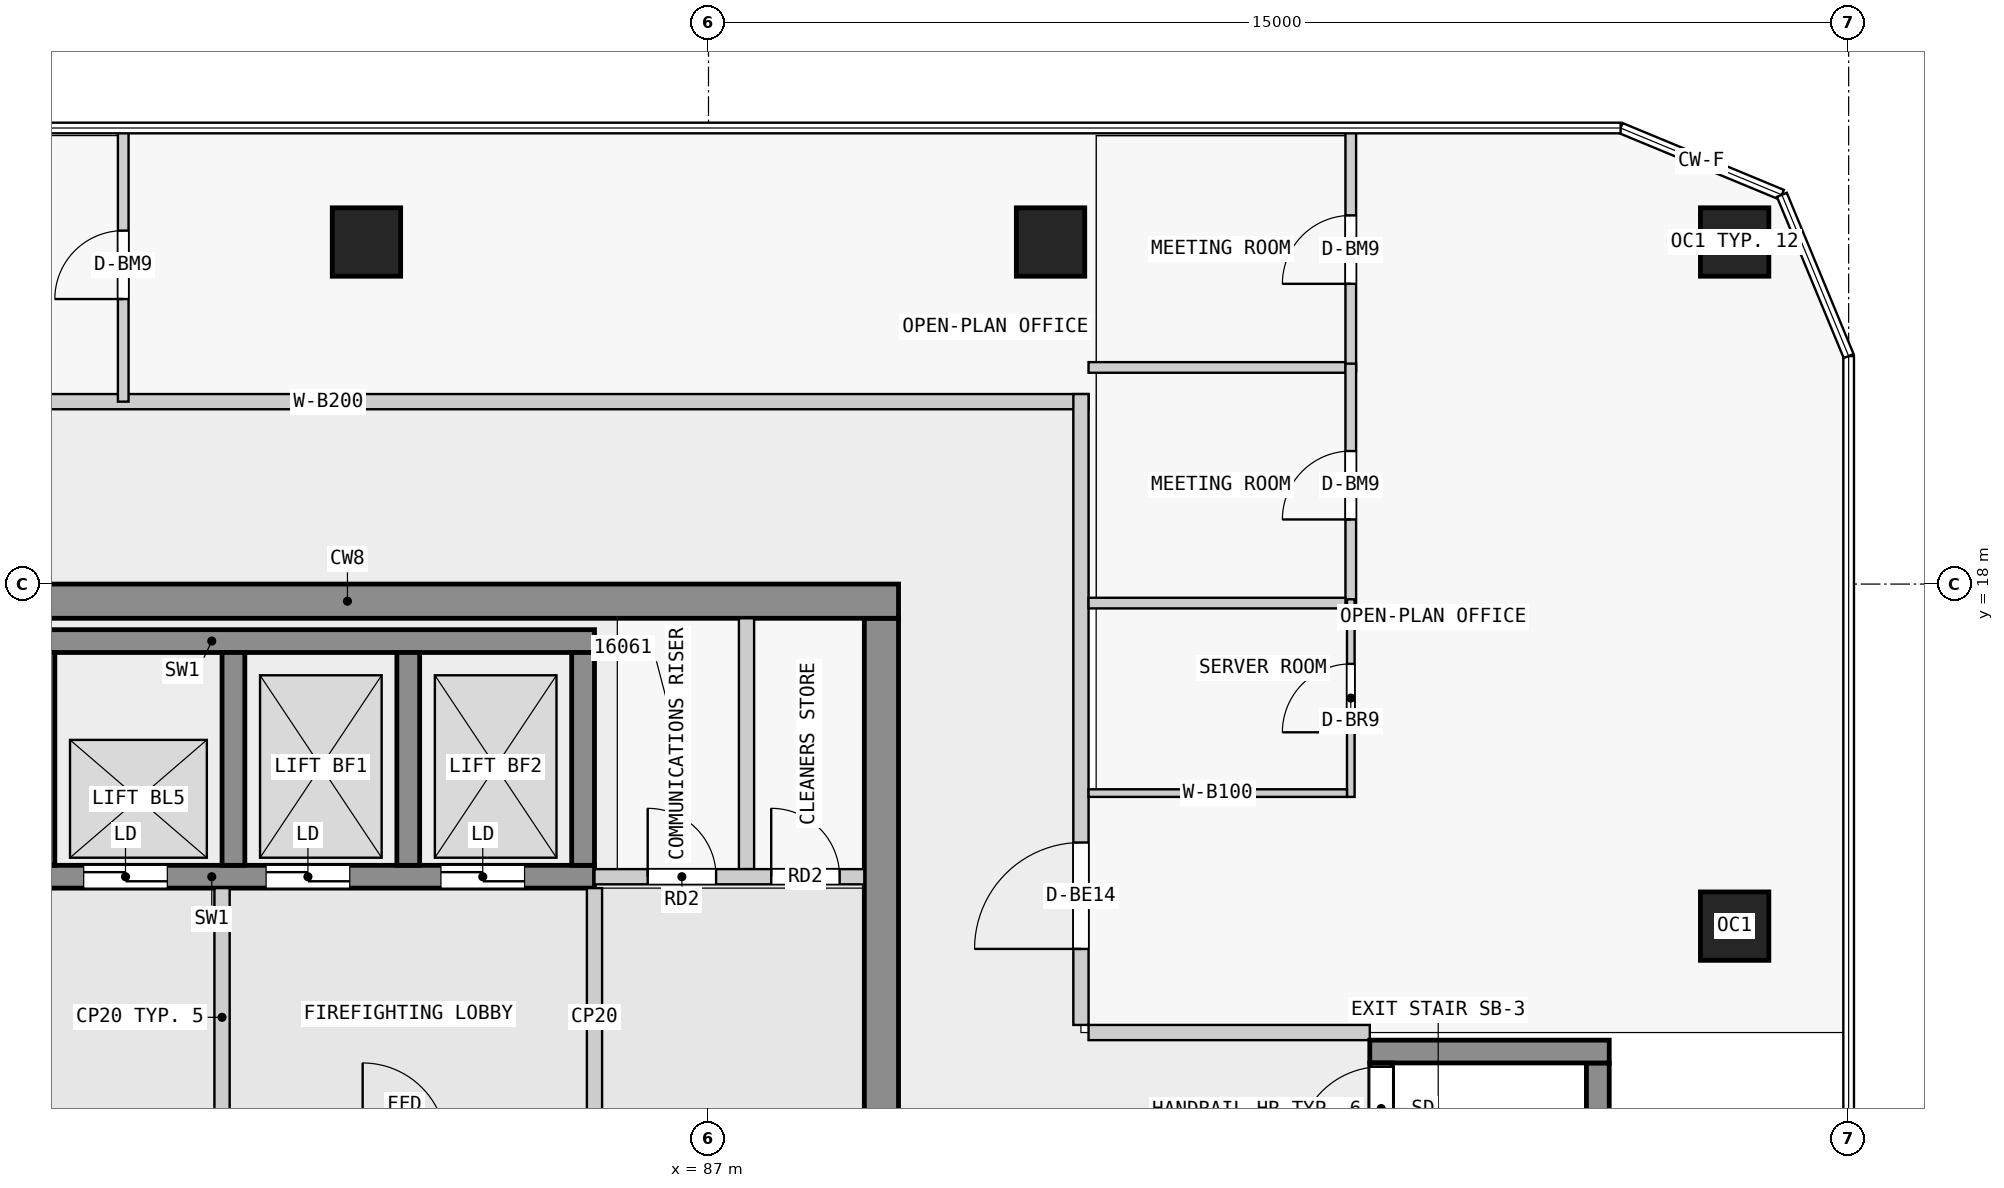
"""IFC4 building model, lengths in metres.
Left out: names, types, materials, properties, quantities, classifications, styles, units other than length and angle.
Written with IfcOpenShell. Run it as: python <this file> out.ifc"""

import sys

from ifc_helpers import new_model, si_unit, direction, frame, frame_2d, origin, origin_2d, place, context, subcontext, project, spatial, rectangle, extrude, element, fill, save


model = new_model("IFC4")
c1 = context("Model", 3, precision=1e-05, world=origin(), true_north=direction((0.0, 1.0)))
c2 = subcontext(c1, "Body", "Model", "MODEL_VIEW")
j1 = project(units=[si_unit("LENGTHUNIT", "METRE"), si_unit("PLANEANGLEUNIT", "RADIAN")], contexts=[c1])
p1 = place(None, origin())
s1 = spatial("IfcSite", under=j1, at=p1, CompositionType="ELEMENT")
p2 = place(p1, origin())
s2 = spatial("IfcBuilding", under=s1, at=p2, CompositionType="ELEMENT")
p3 = place(p2, frame((0.0, 0.0, 65.3)))
s3 = spatial("IfcBuildingStorey", under=s2, at=p3, CompositionType="ELEMENT", Elevation=65.3)
for number, where, z_axis, x_axis in (
    (1, (100.5, 13.5, 0.0), (0.0, 0.0, 1.0), (1.0, 0.0, 0.0)),
    (2, (100.5, 22.5, 0.0), (0.0, 0.0, 1.0), (1.0, 0.0, 0.0)),
    (3, (91.5, 22.5, 0.0), (0.0, 0.0, 1.0), (1.0, 0.0, 0.0)),
    (4, (82.5, 22.5, 0.0), (0.0, 0.0, 1.0), (1.0, 0.0, 0.0)),
):
    element("IfcColumn", number, at=place(p3, frame(where, z_axis=z_axis, x_axis=x_axis)), inside=s3, PredefinedType="COLUMN", context=c2, shape_type="SweptSolid", body=[
        extrude(rectangle(XDim=0.9, YDim=0.9, at=origin_2d()), origin(), (0.0, 0.0, 1.0), 3.5),
    ])
p4 = place(p3, frame((75.0, 17.775, 0.0), z_axis=(0.0, 0.0, 1.0), x_axis=(1.0, 0.0, 0.0)))
e5 = element("IfcWall", 5, at=p4, inside=s3, PredefinedType="SHEAR", context=c2, shape_type="SweptSolid", body=[
    extrude(rectangle(XDim=14.5, YDim=0.45, at=frame_2d((7.25, 0.0))), origin(), (0.0, 0.0, 1.0), 3.25),
])
p5 = place(p3, frame((89.275, 0.45, 0.0), z_axis=(0.0, 0.0, 1.0), x_axis=(0.0, 1.0, 0.0)))
e6 = element("IfcWall", 6, at=p5, inside=s3, PredefinedType="SHEAR", context=c2, shape_type="SweptSolid", body=[
    extrude(rectangle(XDim=17.1, YDim=0.45, at=frame_2d((8.55, 0.0))), origin(), (0.0, 0.0, 1.0), 3.25),
])
p6 = place(p5, frame((7.65, 0.0, 0.0)))
e7 = element("IfcOpeningElement", 7, at=p6, cuts=e6, PredefinedType="OPENING", context=c2, shape_type="SweptSolid", body=[
    extrude(rectangle(XDim=1.8, YDim=2.1, at=frame_2d((0.9, 1.05))), frame((0.0, 0.235, 0.0), z_axis=(0.0, -1.0, 0.0), x_axis=(1.0, 0.0, 0.0)), (0.0, 0.0, 1.0), 0.47),
])
p7 = place(p3, frame((75.43, 17.25, 0.0), z_axis=(0.0, 0.0, 1.0), x_axis=(1.0, 0.0, 0.0)))
e8 = element("IfcWall", 8, at=p7, inside=s3, PredefinedType="SHEAR", context=c2, shape_type="SweptSolid", body=[
    extrude(rectangle(XDim=10.07, YDim=0.3, at=frame_2d((5.035, 0.0))), origin(), (0.0, 0.0, 1.0), 3.25),
])
p8 = place(p3, frame((75.43, 14.15, 0.0), z_axis=(0.0, 0.0, 1.0), x_axis=(1.0, 0.0, 0.0)))
e9 = element("IfcWall", 9, at=p8, inside=s3, PredefinedType="SHEAR", context=c2, shape_type="SweptSolid", body=[
    extrude(rectangle(XDim=10.07, YDim=0.3, at=frame_2d((5.035, 0.0))), origin(), (0.0, 0.0, 1.0), 3.25),
])
p9 = place(p8, frame((0.85, 0.0, 0.0)))
e10 = element("IfcOpeningElement", 10, at=p9, cuts=e9, PredefinedType="OPENING", context=c2, shape_type="SweptSolid", body=[
    extrude(rectangle(XDim=1.1, YDim=2.1, at=frame_2d((0.55, 1.05))), frame((0.0, 0.16, 0.0), z_axis=(0.0, -1.0, 0.0), x_axis=(1.0, 0.0, 0.0)), (0.0, 0.0, 1.0), 0.32),
])
p10 = place(p8, frame((3.35, 0.0, 0.0)))
e11 = element("IfcOpeningElement", 11, at=p10, cuts=e9, PredefinedType="OPENING", context=c2, shape_type="SweptSolid", body=[
    extrude(rectangle(XDim=1.1, YDim=2.1, at=frame_2d((0.55, 1.05))), frame((0.0, 0.16, 0.0), z_axis=(0.0, -1.0, 0.0), x_axis=(1.0, 0.0, 0.0)), (0.0, 0.0, 1.0), 0.32),
])
p11 = place(p8, frame((5.75, 0.0, 0.0)))
e12 = element("IfcOpeningElement", 12, at=p11, cuts=e9, PredefinedType="OPENING", context=c2, shape_type="SweptSolid", body=[
    extrude(rectangle(XDim=1.1, YDim=2.1, at=frame_2d((0.55, 1.05))), frame((0.0, 0.16, 0.0), z_axis=(0.0, -1.0, 0.0), x_axis=(1.0, 0.0, 0.0)), (0.0, 0.0, 1.0), 0.32),
])
p12 = place(p8, frame((8.05, 0.0, 0.0)))
e13 = element("IfcOpeningElement", 13, at=p12, cuts=e9, PredefinedType="OPENING", context=c2, shape_type="SweptSolid", body=[
    extrude(rectangle(XDim=1.1, YDim=2.1, at=frame_2d((0.55, 1.05))), frame((0.0, 0.16, 0.0), z_axis=(0.0, -1.0, 0.0), x_axis=(1.0, 0.0, 0.0)), (0.0, 0.0, 1.0), 0.32),
])
for number, where, z_axis, x_axis in (
    (14, (78.25, 14.3, 0.0), (0.0, 0.0, 1.0), (0.0, 1.0, 0.0)),
    (15, (80.75, 14.3, 0.0), (0.0, 0.0, 1.0), (0.0, 1.0, 0.0)),
    (16, (83.05, 14.3, 0.0), (0.0, 0.0, 1.0), (0.0, 1.0, 0.0)),
    (17, (85.35, 14.3, 0.0), (0.0, 0.0, 1.0), (0.0, 1.0, 0.0)),
):
    element("IfcWall", number, at=place(p3, frame(where, z_axis=z_axis, x_axis=x_axis)), inside=s3, PredefinedType="SHEAR", context=c2, shape_type="SweptSolid", body=[
        extrude(rectangle(XDim=2.8, YDim=0.3, at=frame_2d((1.4, 0.0))), origin(), (0.0, 0.0, 1.0), 3.25),
    ])
p13 = place(p3, frame((95.85, 5.3, 0.0), z_axis=(0.0, 0.0, 1.0), x_axis=(0.0, 1.0, 0.0)))
e18 = element("IfcWall", 18, at=p13, inside=s3, PredefinedType="SHEAR", context=c2, shape_type="SweptSolid", body=[
    extrude(rectangle(XDim=6.4, YDim=0.3, at=frame_2d((3.2, 0.0))), origin(), (0.0, 0.0, 1.0), 3.25),
])
p14 = place(p13, frame((5.25, 0.0, 0.0)))
e19 = element("IfcOpeningElement", 19, at=p14, cuts=e18, PredefinedType="OPENING", context=c2, shape_type="SweptSolid", body=[
    extrude(rectangle(XDim=1.1, YDim=2.1, at=frame_2d((0.55, 1.05))), frame((0.0, 0.16, 0.0), z_axis=(0.0, -1.0, 0.0), x_axis=(1.0, 0.0, 0.0)), (0.0, 0.0, 1.0), 0.32),
])
p15 = place(p3, frame((98.7, 5.3, 0.0), z_axis=(0.0, 0.0, 1.0), x_axis=(0.0, 1.0, 0.0)))
e20 = element("IfcWall", 20, at=p15, inside=s3, PredefinedType="SHEAR", context=c2, shape_type="SweptSolid", body=[
    extrude(rectangle(XDim=6.4, YDim=0.3, at=frame_2d((3.2, 0.0))), origin(), (0.0, 0.0, 1.0), 3.25),
])
p16 = place(p3, frame((95.7, 11.85, 0.0), z_axis=(0.0, 0.0, 1.0), x_axis=(1.0, 0.0, 0.0)))
e21 = element("IfcWall", 21, at=p16, inside=s3, PredefinedType="SHEAR", context=c2, shape_type="SweptSolid", body=[
    extrude(rectangle(XDim=3.15, YDim=0.3, at=frame_2d((1.575, 0.0))), origin(), (0.0, 0.0, 1.0), 3.25),
])
for number, where, z_axis, x_axis in (
    (22, (80.6, 10.6, 0.0), (0.0, 0.0, 1.0), (0.0, 1.0, 0.0)),
    (23, (85.5, 10.6, 0.0), (0.0, 0.0, 1.0), (0.0, 1.0, 0.0)),
):
    element("IfcWall", number, at=place(p3, frame(where, z_axis=z_axis, x_axis=x_axis)), inside=s3, PredefinedType="PARTITIONING", context=c2, shape_type="SweptSolid", body=[
        extrude(rectangle(XDim=3.4, YDim=0.2, at=frame_2d((1.7, 0.0))), origin(), (0.0, 0.0, 1.0), 3.25),
    ])
p17 = place(p3, frame((85.5, 14.15, 0.0), z_axis=(0.0, 0.0, 1.0), x_axis=(1.0, 0.0, 0.0)))
e24 = element("IfcWall", 24, at=p17, inside=s3, PredefinedType="PARTITIONING", context=c2, shape_type="SweptSolid", body=[
    extrude(rectangle(XDim=3.55, YDim=0.2, at=frame_2d((1.775, 0.0))), origin(), (0.0, 0.0, 1.0), 3.25),
])
p18 = place(p17, frame((0.7, 0.0, 0.0)))
e25 = element("IfcOpeningElement", 25, at=p18, cuts=e24, PredefinedType="OPENING", context=c2, shape_type="SweptSolid", body=[
    extrude(rectangle(XDim=0.9, YDim=2.1, at=frame_2d((0.45, 1.05))), frame((0.0, 0.11, 0.0), z_axis=(0.0, -1.0, 0.0), x_axis=(1.0, 0.0, 0.0)), (0.0, 0.0, 1.0), 0.22),
])
p19 = place(p17, frame((2.325, 0.0, 0.0)))
e26 = element("IfcOpeningElement", 26, at=p19, cuts=e24, PredefinedType="OPENING", context=c2, shape_type="SweptSolid", body=[
    extrude(rectangle(XDim=0.9, YDim=2.1, at=frame_2d((0.45, 1.05))), frame((0.0, 0.11, 0.0), z_axis=(0.0, -1.0, 0.0), x_axis=(1.0, 0.0, 0.0)), (0.0, 0.0, 1.0), 0.22),
])
p20 = place(p3, frame((87.5, 14.25, 0.0), z_axis=(0.0, 0.0, 1.0), x_axis=(0.0, 1.0, 0.0)))
e27 = element("IfcWall", 27, at=p20, inside=s3, PredefinedType="PARTITIONING", context=c2, shape_type="SweptSolid", body=[
    extrude(rectangle(XDim=3.3, YDim=0.2, at=frame_2d((1.65, 0.0))), origin(), (0.0, 0.0, 1.0), 3.25),
])
p21 = place(p3, frame((72.0, 20.4, 0.0), z_axis=(0.0, 0.0, 1.0), x_axis=(1.0, 0.0, 0.0)))
e28 = element("IfcWall", 28, at=p21, inside=s3, PredefinedType="PARTITIONING", context=c2, shape_type="SweptSolid", body=[
    extrude(rectangle(XDim=20.0, YDim=0.2, at=frame_2d((10.0, 0.0))), origin(), (0.0, 0.0, 1.0), 3.25),
])
p22 = place(p3, frame((91.9, 12.2, 0.0), z_axis=(0.0, 0.0, 1.0), x_axis=(0.0, 1.0, 0.0)))
e29 = element("IfcWall", 29, at=p22, inside=s3, PredefinedType="PARTITIONING", context=c2, shape_type="SweptSolid", body=[
    extrude(rectangle(XDim=8.3, YDim=0.2, at=frame_2d((4.15, 0.0))), origin(), (0.0, 0.0, 1.0), 3.25),
])
p23 = place(p22, frame((1.0, 0.0, 0.0)))
e30 = element("IfcOpeningElement", 30, at=p23, cuts=e29, PredefinedType="OPENING", context=c2, shape_type="SweptSolid", body=[
    extrude(rectangle(XDim=1.4, YDim=2.4, at=frame_2d((0.7, 1.2))), frame((0.0, 0.11, 0.0), z_axis=(0.0, -1.0, 0.0), x_axis=(1.0, 0.0, 0.0)), (0.0, 0.0, 1.0), 0.22),
])
p24 = place(p3, frame((92.0, 12.1, 0.0), z_axis=(0.0, 0.0, 1.0), x_axis=(1.0, 0.0, 0.0)))
e31 = element("IfcWall", 31, at=p24, inside=s3, PredefinedType="PARTITIONING", context=c2, shape_type="SweptSolid", body=[
    extrude(rectangle(XDim=3.7, YDim=0.2, at=frame_2d((1.85, 0.0))), origin(), (0.0, 0.0, 1.0), 3.25),
])
p25 = place(p3, frame((95.45, 20.8, 0.0), z_axis=(0.0, 0.0, 1.0), x_axis=(0.0, 1.0, 0.0)))
e32 = element("IfcWall", 32, at=p25, inside=s3, PredefinedType="PARTITIONING", context=c2, shape_type="SweptSolid", body=[
    extrude(rectangle(XDim=3.2, YDim=0.14, at=frame_2d((1.6, 0.0))), origin(), (0.0, 0.0, 1.0), 3.25),
])
p26 = place(p25, frame((1.15, 0.0, 0.0)))
e33 = element("IfcOpeningElement", 33, at=p26, cuts=e32, PredefinedType="OPENING", context=c2, shape_type="SweptSolid", body=[
    extrude(rectangle(XDim=0.9, YDim=2.4, at=frame_2d((0.45, 1.2))), frame((0.0, 0.08, 0.0), z_axis=(0.0, -1.0, 0.0), x_axis=(1.0, 0.0, 0.0)), (0.0, 0.0, 1.0), 0.16),
])
p27 = place(p3, frame((92.0, 20.85, 0.0), z_axis=(0.0, 0.0, 1.0), x_axis=(1.0, 0.0, 0.0)))
e34 = element("IfcWall", 34, at=p27, inside=s3, PredefinedType="PARTITIONING", context=c2, shape_type="SweptSolid", body=[
    extrude(rectangle(XDim=3.38, YDim=0.14, at=frame_2d((1.69, 0.0))), origin(), (0.0, 0.0, 1.0), 3.25),
])
p28 = place(p3, frame((95.45, 17.7, 0.0), z_axis=(0.0, 0.0, 1.0), x_axis=(0.0, 1.0, 0.0)))
e35 = element("IfcWall", 35, at=p28, inside=s3, PredefinedType="PARTITIONING", context=c2, shape_type="SweptSolid", body=[
    extrude(rectangle(XDim=3.2, YDim=0.14, at=frame_2d((1.6, 0.0))), origin(), (0.0, 0.0, 1.0), 3.25),
])
p29 = place(p28, frame((1.15, 0.0, 0.0)))
e36 = element("IfcOpeningElement", 36, at=p29, cuts=e35, PredefinedType="OPENING", context=c2, shape_type="SweptSolid", body=[
    extrude(rectangle(XDim=0.9, YDim=2.4, at=frame_2d((0.45, 1.2))), frame((0.0, 0.08, 0.0), z_axis=(0.0, -1.0, 0.0), x_axis=(1.0, 0.0, 0.0)), (0.0, 0.0, 1.0), 0.16),
])
p30 = place(p3, frame((92.0, 17.75, 0.0), z_axis=(0.0, 0.0, 1.0), x_axis=(1.0, 0.0, 0.0)))
e37 = element("IfcWall", 37, at=p30, inside=s3, PredefinedType="PARTITIONING", context=c2, shape_type="SweptSolid", body=[
    extrude(rectangle(XDim=3.38, YDim=0.14, at=frame_2d((1.69, 0.0))), origin(), (0.0, 0.0, 1.0), 3.25),
])
p31 = place(p3, frame((95.45, 15.2, 0.0), z_axis=(0.0, 0.0, 1.0), x_axis=(0.0, 1.0, 0.0)))
e38 = element("IfcWall", 38, at=p31, inside=s3, PredefinedType="PARTITIONING", context=c2, shape_type="SweptSolid", body=[
    extrude(rectangle(XDim=2.6, YDim=0.1, at=frame_2d((1.3, 0.0))), origin(), (0.0, 0.0, 1.0), 3.25),
])
p32 = place(p31, frame((0.85, 0.0, 0.0)))
e39 = element("IfcOpeningElement", 39, at=p32, cuts=e38, PredefinedType="OPENING", context=c2, shape_type="SweptSolid", body=[
    extrude(rectangle(XDim=0.9, YDim=2.1, at=frame_2d((0.45, 1.05))), frame((0.0, 0.06, 0.0), z_axis=(0.0, -1.0, 0.0), x_axis=(1.0, 0.0, 0.0)), (0.0, 0.0, 1.0), 0.12),
])
p33 = place(p3, frame((92.0, 15.25, 0.0), z_axis=(0.0, 0.0, 1.0), x_axis=(1.0, 0.0, 0.0)))
e40 = element("IfcWall", 40, at=p33, inside=s3, PredefinedType="PARTITIONING", context=c2, shape_type="SweptSolid", body=[
    extrude(rectangle(XDim=3.4, YDim=0.1, at=frame_2d((1.7, 0.0))), origin(), (0.0, 0.0, 1.0), 3.25),
])
p34 = place(p3, frame((79.3, 20.4, 0.0), z_axis=(0.0, 0.0, 1.0), x_axis=(0.0, 1.0, 0.0)))
e41 = element("IfcWall", 41, at=p34, inside=s3, PredefinedType="PARTITIONING", context=c2, shape_type="SweptSolid", body=[
    extrude(rectangle(XDim=3.6, YDim=0.14, at=frame_2d((1.8, 0.0))), origin(), (0.0, 0.0, 1.0), 3.25),
])
p35 = place(p34, frame((1.35, 0.0, 0.0)))
e42 = element("IfcOpeningElement", 42, at=p35, cuts=e41, PredefinedType="OPENING", context=c2, shape_type="SweptSolid", body=[
    extrude(rectangle(XDim=0.9, YDim=2.4, at=frame_2d((0.45, 1.2))), frame((0.0, 0.08, 0.0), z_axis=(0.0, -1.0, 0.0), x_axis=(1.0, 0.0, 0.0)), (0.0, 0.0, 1.0), 0.16),
])
p36 = place(p10, origin())
e43 = element("IfcDoor", 43, at=p36, inside=s3, OperationType="DOUBLE_DOOR_SLIDING", PredefinedType="DOOR", context=c2, shape_type="SweptSolid", body=[
    extrude(rectangle(XDim=1.1, YDim=2.1, at=frame_2d((0.55, 1.05))), frame((0.0, 0.025, 0.0), z_axis=(0.0, -1.0, 0.0), x_axis=(1.0, 0.0, 0.0)), (0.0, 0.0, 1.0), 0.05),
])
fill(e11, e43)
p37 = place(p11, origin())
e44 = element("IfcDoor", 44, at=p37, inside=s3, OperationType="DOUBLE_DOOR_SLIDING", PredefinedType="DOOR", context=c2, shape_type="SweptSolid", body=[
    extrude(rectangle(XDim=1.1, YDim=2.1, at=frame_2d((0.55, 1.05))), frame((0.0, 0.025, 0.0), z_axis=(0.0, -1.0, 0.0), x_axis=(1.0, 0.0, 0.0)), (0.0, 0.0, 1.0), 0.05),
])
fill(e12, e44)
p38 = place(p12, origin())
e45 = element("IfcDoor", 45, at=p38, inside=s3, OperationType="DOUBLE_DOOR_SLIDING", PredefinedType="DOOR", context=c2, shape_type="SweptSolid", body=[
    extrude(rectangle(XDim=1.1, YDim=2.1, at=frame_2d((0.55, 1.05))), frame((0.0, 0.025, 0.0), z_axis=(0.0, -1.0, 0.0), x_axis=(1.0, 0.0, 0.0)), (0.0, 0.0, 1.0), 0.05),
])
fill(e13, e45)
p39 = place(p14, origin())
e46 = element("IfcDoor", 46, at=p39, inside=s3, OperationType="SINGLE_SWING_LEFT", PredefinedType="DOOR", context=c2, shape_type="SweptSolid", body=[
    extrude(rectangle(XDim=1.1, YDim=2.1, at=frame_2d((0.55, 1.05))), frame((0.0, 0.025, 0.0), z_axis=(0.0, -1.0, 0.0), x_axis=(1.0, 0.0, 0.0)), (0.0, 0.0, 1.0), 0.05),
])
fill(e19, e46)
p40 = place(p18, origin())
e47 = element("IfcDoor", 47, at=p40, inside=s3, OperationType="SINGLE_SWING_LEFT", PredefinedType="DOOR", context=c2, shape_type="SweptSolid", body=[
    extrude(rectangle(XDim=0.9, YDim=2.1, at=frame_2d((0.45, 1.05))), frame((0.0, 0.025, 0.0), z_axis=(0.0, -1.0, 0.0), x_axis=(1.0, 0.0, 0.0)), (0.0, 0.0, 1.0), 0.05),
])
fill(e25, e47)
p41 = place(p19, origin())
e48 = element("IfcDoor", 48, at=p41, inside=s3, OperationType="SINGLE_SWING_LEFT", PredefinedType="DOOR", context=c2, shape_type="SweptSolid", body=[
    extrude(rectangle(XDim=0.9, YDim=2.1, at=frame_2d((0.45, 1.05))), frame((0.0, 0.025, 0.0), z_axis=(0.0, -1.0, 0.0), x_axis=(1.0, 0.0, 0.0)), (0.0, 0.0, 1.0), 0.05),
])
fill(e26, e48)
p42 = place(p23, origin())
e49 = element("IfcDoor", 49, at=p42, inside=s3, OperationType="DOUBLE_DOOR_SINGLE_SWING", PredefinedType="DOOR", context=c2, shape_type="SweptSolid", body=[
    extrude(rectangle(XDim=1.4, YDim=2.4, at=frame_2d((0.7, 1.2))), frame((0.0, 0.025, 0.0), z_axis=(0.0, -1.0, 0.0), x_axis=(1.0, 0.0, 0.0)), (0.0, 0.0, 1.0), 0.05),
])
fill(e30, e49)
p43 = place(p26, origin())
e50 = element("IfcDoor", 50, at=p43, inside=s3, OperationType="SINGLE_SWING_LEFT", PredefinedType="DOOR", context=c2, shape_type="SweptSolid", body=[
    extrude(rectangle(XDim=0.9, YDim=2.4, at=frame_2d((0.45, 1.2))), frame((0.0, 0.025, 0.0), z_axis=(0.0, -1.0, 0.0), x_axis=(1.0, 0.0, 0.0)), (0.0, 0.0, 1.0), 0.05),
])
fill(e33, e50)
p44 = place(p29, origin())
e51 = element("IfcDoor", 51, at=p44, inside=s3, OperationType="SINGLE_SWING_LEFT", PredefinedType="DOOR", context=c2, shape_type="SweptSolid", body=[
    extrude(rectangle(XDim=0.9, YDim=2.4, at=frame_2d((0.45, 1.2))), frame((0.0, 0.025, 0.0), z_axis=(0.0, -1.0, 0.0), x_axis=(1.0, 0.0, 0.0)), (0.0, 0.0, 1.0), 0.05),
])
fill(e36, e51)
p45 = place(p32, origin())
e52 = element("IfcDoor", 52, at=p45, inside=s3, OperationType="SINGLE_SWING_LEFT", PredefinedType="DOOR", context=c2, shape_type="SweptSolid", body=[
    extrude(rectangle(XDim=0.9, YDim=2.1, at=frame_2d((0.45, 1.05))), frame((0.0, 0.025, 0.0), z_axis=(0.0, -1.0, 0.0), x_axis=(1.0, 0.0, 0.0)), (0.0, 0.0, 1.0), 0.05),
])
fill(e39, e52)
p46 = place(p35, origin())
e53 = element("IfcDoor", 53, at=p46, inside=s3, OperationType="SINGLE_SWING_LEFT", PredefinedType="DOOR", context=c2, shape_type="SweptSolid", body=[
    extrude(rectangle(XDim=0.9, YDim=2.4, at=frame_2d((0.45, 1.2))), frame((0.0, 0.025, 0.0), z_axis=(0.0, -1.0, 0.0), x_axis=(1.0, 0.0, 0.0)), (0.0, 0.0, 1.0), 0.05),
])
fill(e42, e53)
save(model, sys.argv[1])
